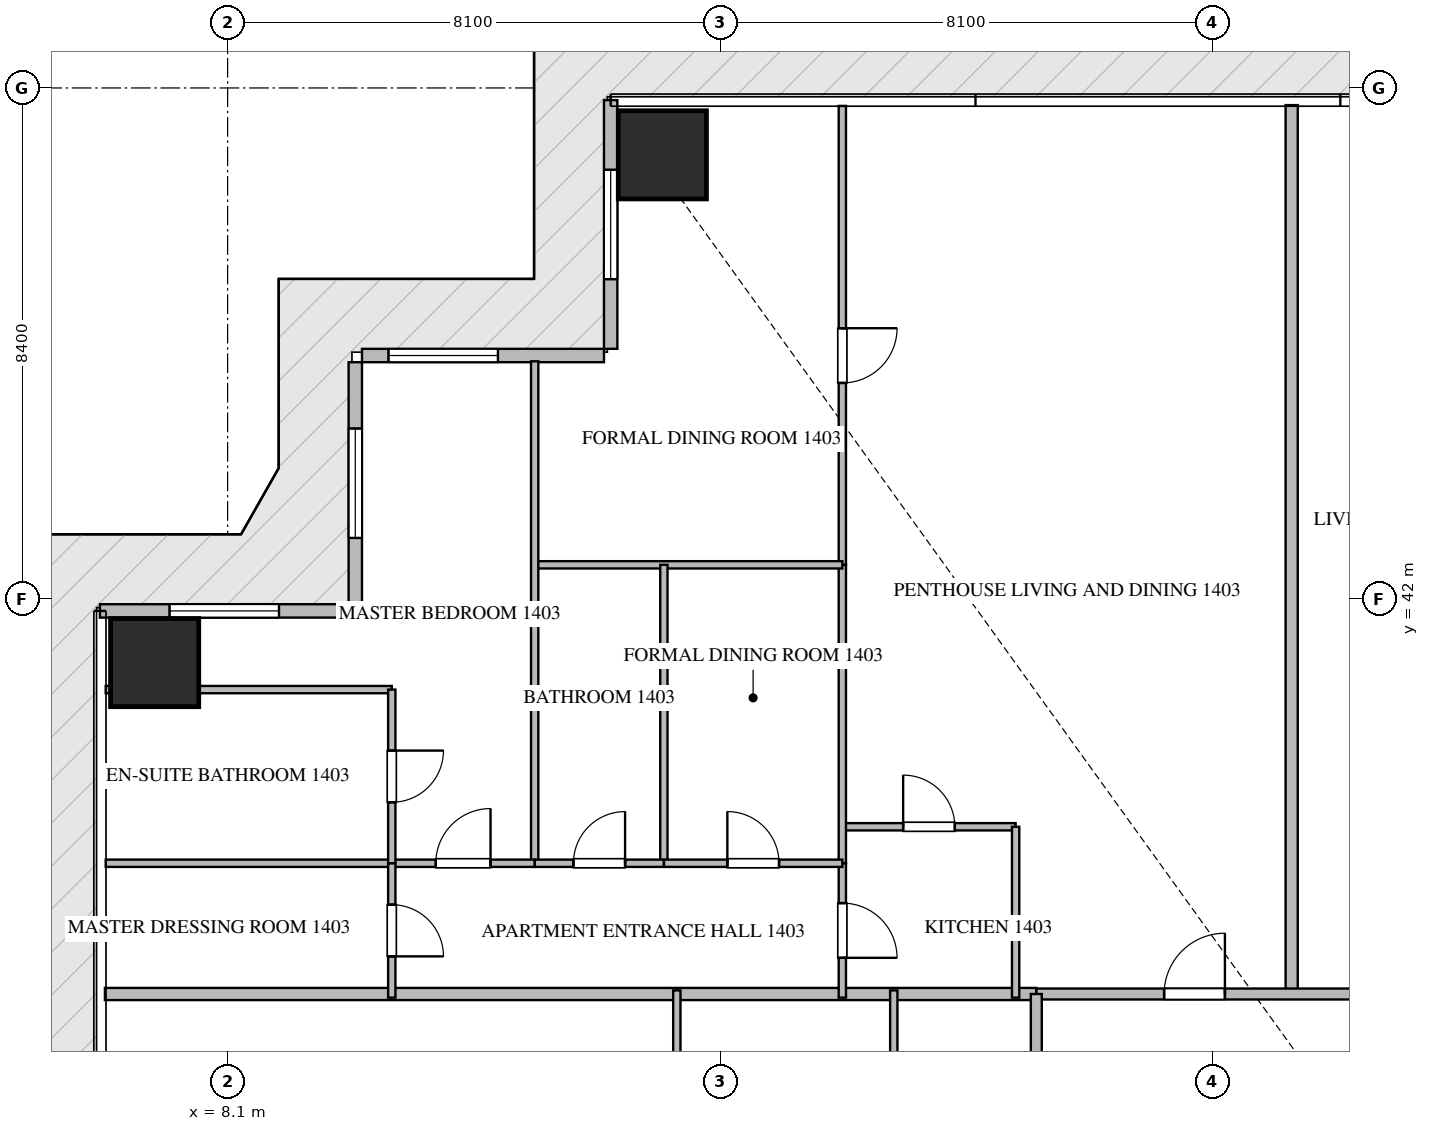
"""IFC4 building model, lengths in metres.
Left out: names, types, materials, properties, quantities, classifications, styles, units other than length and angle.
Written with IfcOpenShell. Run it as: python <this file> out.ifc"""

import sys

from ifc_helpers import new_model, si_unit, direction, frame, frame_2d, origin, origin_2d, place, context, subcontext, project, spatial, rectangle, extrude, source, transform, mapped, element, fill, save


model = new_model("IFC4")
c1 = context("Model", 3, precision=1e-05, world=origin(), true_north=direction((0.0, 1.0)))
c2 = subcontext(c1, "Body", "Model", "MODEL_VIEW")
j1 = project(units=[si_unit("LENGTHUNIT", "METRE"), si_unit("PLANEANGLEUNIT", "RADIAN")], contexts=[c1])
p1 = place(None, origin())
s1 = spatial("IfcSite", under=j1, at=p1, CompositionType="ELEMENT")
p2 = place(p1, origin())
s2 = spatial("IfcBuilding", under=s1, at=p2, CompositionType="ELEMENT")
p3 = place(p2, frame((0.0, 0.0, 60.45)))
s3 = spatial("IfcBuildingStorey", under=s2, at=p3, CompositionType="ELEMENT", Elevation=60.45)
m1 = source(origin(), c2, "Body", "SweptSolid", [
    extrude(rectangle(XDim=1.45, YDim=1.45, at=origin_2d()), origin(), (0.0, 0.0, 1.0), 3.75),
])
for number, where, z_axis, x_axis in (
    (1, (15.25, 49.3, -0.26), (0.0, 0.0, 1.0), (1.0, 0.0, 0.0)),
    (2, (6.9, 40.95, -0.26), (0.0, 0.0, 1.0), (1.0, 0.0, 0.0)),
):
    element("IfcColumn", number, at=place(p3, frame(where, z_axis=z_axis, x_axis=x_axis)), inside=s3, PredefinedType="COLUMN", context=c2, shape_type="MappedRepresentation", body=[
        mapped(m1, transform((0.0, 0.0, 0.0), scale=1.0)),
    ])
p4 = place(p3, frame((14.4, 50.2, 0.0), z_axis=(0.0, 0.0, 1.0), x_axis=(0.0, -1.0, 0.0)))
e3 = element("IfcWall", 3, at=p4, inside=s3, PredefinedType="ELEMENTEDWALL", context=c2, shape_type="SweptSolid", body=[
    extrude(rectangle(XDim=4.09, YDim=0.22, at=frame_2d((2.045, 0.0))), origin(), (0.0, 0.0, 1.0), 3.475),
])
p5 = place(p4, frame((1.145, 0.0, 0.65)))
e4 = element("IfcOpeningElement", 4, at=p5, cuts=e3, PredefinedType="OPENING", context=c2, shape_type="SweptSolid", body=[
    extrude(rectangle(XDim=1.8, YDim=2.1, at=frame_2d((0.9, 1.05))), frame((0.0, 0.12, 0.0), z_axis=(0.0, -1.0, 0.0), x_axis=(1.0, 0.0, 0.0)), (0.0, 0.0, 1.0), 0.24),
])
p6 = place(p3, frame((14.29, 46.0, 0.0), z_axis=(0.0, 0.0, 1.0), x_axis=(-1.0, 0.0, 0.0)))
e5 = element("IfcWall", 5, at=p6, inside=s3, PredefinedType="ELEMENTEDWALL", context=c2, shape_type="SweptSolid", body=[
    extrude(rectangle(XDim=3.98, YDim=0.22, at=frame_2d((1.99, 0.0))), origin(), (0.0, 0.0, 1.0), 3.475),
])
p7 = place(p6, frame((1.744, 0.0, 0.65)))
e6 = element("IfcOpeningElement", 6, at=p7, cuts=e5, PredefinedType="OPENING", context=c2, shape_type="SweptSolid", body=[
    extrude(rectangle(XDim=1.8, YDim=2.1, at=frame_2d((0.9, 1.05))), frame((0.0, 0.12, 0.0), z_axis=(0.0, -1.0, 0.0), x_axis=(1.0, 0.0, 0.0)), (0.0, 0.0, 1.0), 0.24),
])
p8 = place(p3, frame((10.2, 45.89, 0.0), z_axis=(0.0, 0.0, 1.0), x_axis=(0.0, -1.0, 0.0)))
e7 = element("IfcWall", 7, at=p8, inside=s3, PredefinedType="ELEMENTEDWALL", context=c2, shape_type="SweptSolid", body=[
    extrude(rectangle(XDim=3.98, YDim=0.22, at=frame_2d((1.99, 0.0))), origin(), (0.0, 0.0, 1.0), 3.475),
])
p9 = place(p8, frame((1.09, 0.0, 0.65)))
e8 = element("IfcOpeningElement", 8, at=p9, cuts=e7, PredefinedType="OPENING", context=c2, shape_type="SweptSolid", body=[
    extrude(rectangle(XDim=1.8, YDim=2.1, at=frame_2d((0.9, 1.05))), frame((0.0, 0.12, 0.0), z_axis=(0.0, -1.0, 0.0), x_axis=(1.0, 0.0, 0.0)), (0.0, 0.0, 1.0), 0.24),
])
p10 = place(p3, frame((10.09, 41.8, 0.0), z_axis=(0.0, 0.0, 1.0), x_axis=(-1.0, 0.0, 0.0)))
e9 = element("IfcWall", 9, at=p10, inside=s3, PredefinedType="ELEMENTEDWALL", context=c2, shape_type="SweptSolid", body=[
    extrude(rectangle(XDim=4.09, YDim=0.22, at=frame_2d((2.045, 0.0))), origin(), (0.0, 0.0, 1.0), 3.475),
])
p11 = place(p10, frame((1.145, 0.0, 0.65)))
e10 = element("IfcOpeningElement", 10, at=p11, cuts=e9, PredefinedType="OPENING", context=c2, shape_type="SweptSolid", body=[
    extrude(rectangle(XDim=1.8, YDim=2.1, at=frame_2d((0.9, 1.05))), frame((0.0, 0.12, 0.0), z_axis=(0.0, -1.0, 0.0), x_axis=(1.0, 0.0, 0.0)), (0.0, 0.0, 1.0), 0.24),
])
p12 = place(p3, frame((25.6, 35.5, 0.0), z_axis=(0.0, 0.0, 1.0), x_axis=(0.0, 1.0, 0.0)))
e11 = element("IfcWall", 11, at=p12, inside=s3, PredefinedType="PARTITIONING", context=c2, shape_type="SweptSolid", body=[
    extrude(rectangle(XDim=14.618, YDim=0.2, at=frame_2d((7.309, 0.0))), origin(), (0.0, 0.0, 1.0), 3.49),
])
p13 = place(p3, frame((6.082, 35.5, 0.0), z_axis=(0.0, 0.0, 1.0), x_axis=(1.0, 0.0, 0.0)))
e12 = element("IfcWall", 12, at=p13, inside=s3, PredefinedType="PARTITIONING", context=c2, shape_type="SweptSolid", body=[
    extrude(rectangle(XDim=15.318, YDim=0.2, at=frame_2d((7.659, 0.0))), origin(), (0.0, 0.0, 1.0), 3.49),
])
p14 = place(p3, frame((21.402, 35.5, 0.0), z_axis=(0.0, 0.0, 1.0), x_axis=(1.0, 0.0, 0.0)))
e13 = element("IfcWall", 13, at=p14, inside=s3, PredefinedType="PARTITIONING", context=c2, shape_type="SweptSolid", body=[
    extrude(rectangle(XDim=21.996, YDim=0.18, at=frame_2d((10.998, 0.0))), origin(), (0.0, 0.0, 1.0), 3.49),
])
p15 = place(p14, frame((2.1, 0.0, 0.0)))
e14 = element("IfcOpeningElement", 14, at=p15, cuts=e13, PredefinedType="OPENING", context=c2, shape_type="SweptSolid", body=[
    extrude(rectangle(XDim=1.0, YDim=2.15, at=frame_2d((0.5, 1.075))), frame((0.0, 0.1, 0.0), z_axis=(0.0, -1.0, 0.0), x_axis=(1.0, 0.0, 0.0)), (0.0, 0.0, 1.0), 0.2),
])
p16 = place(p14, frame((5.942, 0.0, 0.0)))
e15 = element("IfcOpeningElement", 15, at=p16, cuts=e13, PredefinedType="OPENING", context=c2, shape_type="SweptSolid", body=[
    extrude(rectangle(XDim=1.0, YDim=2.15, at=frame_2d((0.5, 1.075))), frame((0.0, 0.1, 0.0), z_axis=(0.0, -1.0, 0.0), x_axis=(1.0, 0.0, 0.0)), (0.0, 0.0, 1.0), 0.2),
])
p17 = place(p14, frame((16.272, 0.0, 0.0)))
e16 = element("IfcOpeningElement", 16, at=p17, cuts=e13, PredefinedType="OPENING", context=c2, shape_type="SweptSolid", body=[
    extrude(rectangle(XDim=1.0, YDim=2.15, at=frame_2d((0.5, 1.075))), frame((0.0, 0.1, 0.0), z_axis=(0.0, -1.0, 0.0), x_axis=(1.0, 0.0, 0.0)), (0.0, 0.0, 1.0), 0.2),
])
p18 = place(p3, frame((21.4, 14.9, 0.0), z_axis=(0.0, 0.0, 1.0), x_axis=(0.0, 1.0, 0.0)))
e17 = element("IfcWall", 17, at=p18, inside=s3, PredefinedType="PARTITIONING", context=c2, shape_type="SweptSolid", body=[
    extrude(rectangle(XDim=20.6, YDim=0.18, at=frame_2d((10.3, 0.0))), origin(), (0.0, 0.0, 1.0), 3.49),
])
p19 = place(p18, frame((8.996, 0.0, 0.0)))
e18 = element("IfcOpeningElement", 18, at=p19, cuts=e17, PredefinedType="OPENING", context=c2, shape_type="SweptSolid", body=[
    extrude(rectangle(XDim=1.0, YDim=2.15, at=frame_2d((0.5, 1.075))), frame((0.0, 0.1, 0.0), z_axis=(0.0, -1.0, 0.0), x_axis=(1.0, 0.0, 0.0)), (0.0, 0.0, 1.0), 0.2),
])
p20 = place(p18, frame((13.191, 0.0, 0.0)))
e19 = element("IfcOpeningElement", 19, at=p20, cuts=e17, PredefinedType="OPENING", context=c2, shape_type="SweptSolid", body=[
    extrude(rectangle(XDim=1.0, YDim=2.15, at=frame_2d((0.5, 1.075))), frame((0.0, 0.1, 0.0), z_axis=(0.0, -1.0, 0.0), x_axis=(1.0, 0.0, 0.0)), (0.0, 0.0, 1.0), 0.2),
])
p21 = place(p3, frame((18.21, 38.25, 0.0), z_axis=(0.0, 0.0, 1.0), x_axis=(1.0, 0.0, 0.0)))
e20 = element("IfcWall", 20, at=p21, inside=s3, PredefinedType="PARTITIONING", context=c2, shape_type="SweptSolid", body=[
    extrude(rectangle(XDim=2.85, YDim=0.12, at=frame_2d((1.425, 0.0))), origin(), (0.0, 0.0, 1.0), 3.49),
])
p22 = place(p21, frame((1.0, 0.0, 0.0)))
e21 = element("IfcOpeningElement", 21, at=p22, cuts=e20, PredefinedType="OPENING", context=c2, shape_type="SweptSolid", body=[
    extrude(rectangle(XDim=0.85, YDim=2.1, at=frame_2d((0.425, 1.05))), frame((0.0, 0.07, 0.0), z_axis=(0.0, -1.0, 0.0), x_axis=(1.0, 0.0, 0.0)), (0.0, 0.0, 1.0), 0.14),
])
p23 = place(p3, frame((21.06, 38.25, 0.0), z_axis=(0.0, 0.0, 1.0), x_axis=(0.0, -1.0, 0.0)))
e22 = element("IfcWall", 22, at=p23, inside=s3, PredefinedType="PARTITIONING", context=c2, shape_type="SweptSolid", body=[
    extrude(rectangle(XDim=2.81, YDim=0.12, at=frame_2d((1.405, 0.0))), origin(), (0.0, 0.0, 1.0), 3.49),
])
p24 = place(p3, frame((18.21, 37.65, 0.0), z_axis=(0.0, 0.0, 1.0), x_axis=(0.0, -1.0, 0.0)))
e23 = element("IfcWall", 23, at=p24, inside=s3, PredefinedType="PARTITIONING", context=c2, shape_type="SweptSolid", body=[
    extrude(rectangle(XDim=2.21, YDim=0.12, at=frame_2d((1.105, 0.0))), origin(), (0.0, 0.0, 1.0), 3.49),
])
p25 = place(p24, frame((0.655, 0.0, 0.0)))
e24 = element("IfcOpeningElement", 24, at=p25, cuts=e23, PredefinedType="OPENING", context=c2, shape_type="SweptSolid", body=[
    extrude(rectangle(XDim=0.9, YDim=2.1, at=frame_2d((0.45, 1.05))), frame((0.0, 0.07, 0.0), z_axis=(0.0, -1.0, 0.0), x_axis=(1.0, 0.0, 0.0)), (0.0, 0.0, 1.0), 0.14),
])
p26 = place(p3, frame((18.21, 50.105, 0.0), z_axis=(0.0, 0.0, 1.0), x_axis=(0.0, -1.0, 0.0)))
e25 = element("IfcWall", 25, at=p26, inside=s3, PredefinedType="PARTITIONING", context=c2, shape_type="SweptSolid", body=[
    extrude(rectangle(XDim=7.547, YDim=0.12, at=frame_2d((3.773, 0.0))), origin(), (0.0, 0.0, 1.0), 3.49),
])
p27 = place(p26, frame((3.656, 0.0, 0.0)))
e26 = element("IfcOpeningElement", 26, at=p27, cuts=e25, PredefinedType="OPENING", context=c2, shape_type="SweptSolid", body=[
    extrude(rectangle(XDim=0.9, YDim=2.1, at=frame_2d((0.45, 1.05))), frame((0.0, 0.07, 0.0), z_axis=(0.0, -1.0, 0.0), x_axis=(1.0, 0.0, 0.0)), (0.0, 0.0, 1.0), 0.14),
])
p28 = place(p3, frame((18.21, 42.556, 0.0), z_axis=(0.0, 0.0, 1.0), x_axis=(0.0, -1.0, 0.0)))
e27 = element("IfcWall", 27, at=p28, inside=s3, PredefinedType="PARTITIONING", context=c2, shape_type="SweptSolid", body=[
    extrude(rectangle(XDim=4.904, YDim=0.12, at=frame_2d((2.452, 0.0))), origin(), (0.0, 0.0, 1.0), 3.49),
])
p29 = place(p3, frame((13.15, 42.558, 0.0), z_axis=(0.0, 0.0, 1.0), x_axis=(1.0, 0.0, 0.0)))
e28 = element("IfcWall", 28, at=p29, inside=s3, PredefinedType="PARTITIONING", context=c2, shape_type="SweptSolid", body=[
    extrude(rectangle(XDim=5.06, YDim=0.12, at=frame_2d((2.53, 0.0))), origin(), (0.0, 0.0, 1.0), 3.49),
])
p30 = place(p3, frame((13.15, 45.905, 0.0), z_axis=(0.0, 0.0, 1.0), x_axis=(0.0, -1.0, 0.0)))
e29 = element("IfcWall", 29, at=p30, inside=s3, PredefinedType="PARTITIONING", context=c2, shape_type="SweptSolid", body=[
    extrude(rectangle(XDim=8.255, YDim=0.12, at=frame_2d((4.127, 0.0))), origin(), (0.0, 0.0, 1.0), 3.49),
])
p31 = place(p3, frame((15.275, 42.558, 0.0), z_axis=(0.0, 0.0, 1.0), x_axis=(0.0, -1.0, 0.0)))
e30 = element("IfcWall", 30, at=p31, inside=s3, PredefinedType="PARTITIONING", context=c2, shape_type="SweptSolid", body=[
    extrude(rectangle(XDim=4.908, YDim=0.12, at=frame_2d((2.454, 0.0))), origin(), (0.0, 0.0, 1.0), 2.922),
])
p32 = place(p3, frame((13.15, 37.65, 0.0), z_axis=(0.0, 0.0, 1.0), x_axis=(1.0, 0.0, 0.0)))
e31 = element("IfcWall", 31, at=p32, inside=s3, PredefinedType="PARTITIONING", context=c2, shape_type="SweptSolid", body=[
    extrude(rectangle(XDim=2.125, YDim=0.12, at=frame_2d((1.062, 0.0))), origin(), (0.0, 0.0, 1.0), 3.49),
])
p33 = place(p32, frame((0.637, 0.0, 0.0)))
e32 = element("IfcOpeningElement", 32, at=p33, cuts=e31, PredefinedType="OPENING", context=c2, shape_type="SweptSolid", body=[
    extrude(rectangle(XDim=0.85, YDim=2.1, at=frame_2d((0.425, 1.05))), frame((0.0, 0.07, 0.0), z_axis=(0.0, -1.0, 0.0), x_axis=(1.0, 0.0, 0.0)), (0.0, 0.0, 1.0), 0.14),
])
p34 = place(p3, frame((15.277, 37.65, 0.0), z_axis=(0.0, 0.0, 1.0), x_axis=(1.0, 0.0, 0.0)))
e33 = element("IfcWall", 33, at=p34, inside=s3, PredefinedType="PARTITIONING", context=c2, shape_type="SweptSolid", body=[
    extrude(rectangle(XDim=2.933, YDim=0.12, at=frame_2d((1.466, 0.0))), origin(), (0.0, 0.0, 1.0), 3.49),
])
p35 = place(p34, frame((1.042, 0.0, 0.0)))
e34 = element("IfcOpeningElement", 34, at=p35, cuts=e33, PredefinedType="OPENING", context=c2, shape_type="SweptSolid", body=[
    extrude(rectangle(XDim=0.85, YDim=2.1, at=frame_2d((0.425, 1.05))), frame((0.0, 0.07, 0.0), z_axis=(0.0, -1.0, 0.0), x_axis=(1.0, 0.0, 0.0)), (0.0, 0.0, 1.0), 0.14),
])
p36 = place(p3, frame((10.8, 37.65, 0.0), z_axis=(0.0, 0.0, 1.0), x_axis=(1.0, 0.0, 0.0)))
e35 = element("IfcWall", 35, at=p36, inside=s3, PredefinedType="PARTITIONING", context=c2, shape_type="SweptSolid", body=[
    extrude(rectangle(XDim=2.348, YDim=0.12, at=frame_2d((1.174, 0.0))), origin(), (0.0, 0.0, 1.0), 3.49),
])
p37 = place(p36, frame((0.724, 0.0, 0.0)))
e36 = element("IfcOpeningElement", 36, at=p37, cuts=e35, PredefinedType="OPENING", context=c2, shape_type="SweptSolid", body=[
    extrude(rectangle(XDim=0.9, YDim=2.1, at=frame_2d((0.45, 1.05))), frame((0.0, 0.07, 0.0), z_axis=(0.0, -1.0, 0.0), x_axis=(1.0, 0.0, 0.0)), (0.0, 0.0, 1.0), 0.14),
])
p38 = place(p3, frame((6.095, 40.506, 0.0), z_axis=(0.0, 0.0, 1.0), x_axis=(1.0, 0.0, 0.0)))
e37 = element("IfcWall", 37, at=p38, inside=s3, PredefinedType="PARTITIONING", context=c2, shape_type="SweptSolid", body=[
    extrude(rectangle(XDim=4.705, YDim=0.12, at=frame_2d((2.353, 0.0))), origin(), (0.0, 0.0, 1.0), 3.49),
])
p39 = place(p3, frame((6.095, 37.65, 0.0), z_axis=(0.0, 0.0, 1.0), x_axis=(1.0, 0.0, 0.0)))
e38 = element("IfcWall", 38, at=p39, inside=s3, PredefinedType="PARTITIONING", context=c2, shape_type="SweptSolid", body=[
    extrude(rectangle(XDim=4.703, YDim=0.12, at=frame_2d((2.352, 0.0))), origin(), (0.0, 0.0, 1.0), 3.49),
])
p40 = place(p3, frame((10.8, 40.506, 0.0), z_axis=(0.0, 0.0, 1.0), x_axis=(0.0, -1.0, 0.0)))
e39 = element("IfcWall", 39, at=p40, inside=s3, PredefinedType="PARTITIONING", context=c2, shape_type="SweptSolid", body=[
    extrude(rectangle(XDim=2.856, YDim=0.12, at=frame_2d((1.428, 0.0))), origin(), (0.0, 0.0, 1.0), 3.49),
])
p41 = place(p40, frame((1.003, 0.0, 0.0)))
e40 = element("IfcOpeningElement", 40, at=p41, cuts=e39, PredefinedType="OPENING", context=c2, shape_type="SweptSolid", body=[
    extrude(rectangle(XDim=0.85, YDim=2.1, at=frame_2d((0.425, 1.05))), frame((0.0, 0.07, 0.0), z_axis=(0.0, -1.0, 0.0), x_axis=(1.0, 0.0, 0.0)), (0.0, 0.0, 1.0), 0.14),
])
p42 = place(p3, frame((10.8, 37.648, 0.0), z_axis=(0.0, 0.0, 1.0), x_axis=(0.0, -1.0, 0.0)))
e41 = element("IfcWall", 41, at=p42, inside=s3, PredefinedType="PARTITIONING", context=c2, shape_type="SweptSolid", body=[
    extrude(rectangle(XDim=2.208, YDim=0.12, at=frame_2d((1.104, 0.0))), origin(), (0.0, 0.0, 1.0), 3.49),
])
p43 = place(p42, frame((0.679, 0.0, 0.0)))
e42 = element("IfcOpeningElement", 42, at=p43, cuts=e41, PredefinedType="OPENING", context=c2, shape_type="SweptSolid", body=[
    extrude(rectangle(XDim=0.85, YDim=2.1, at=frame_2d((0.425, 1.05))), frame((0.0, 0.07, 0.0), z_axis=(0.0, -1.0, 0.0), x_axis=(1.0, 0.0, 0.0)), (0.0, 0.0, 1.0), 0.14),
])
p44 = place(p3, frame((15.488, 31.0, 0.0), z_axis=(0.0, 0.0, 1.0), x_axis=(0.0, 1.0, 0.0)))
e43 = element("IfcWall", 43, at=p44, inside=s3, PredefinedType="PARTITIONING", context=c2, shape_type="SweptSolid", body=[
    extrude(rectangle(XDim=4.56, YDim=0.12, at=frame_2d((2.28, 0.0))), origin(), (0.0, 0.0, 1.0), 2.922),
])
p45 = place(p3, frame((19.056, 31.0, 0.0), z_axis=(0.0, 0.0, 1.0), x_axis=(0.0, 1.0, 0.0)))
e44 = element("IfcWall", 44, at=p45, inside=s3, PredefinedType="PARTITIONING", context=c2, shape_type="SweptSolid", body=[
    extrude(rectangle(XDim=4.56, YDim=0.12, at=frame_2d((2.28, 0.0))), origin(), (0.0, 0.0, 1.0), 3.49),
])
m2 = source(origin(), c2, "Body", "SweptSolid", [
    extrude(rectangle(XDim=1.8, YDim=2.1, at=frame_2d((0.9, 1.05))), frame((0.0, 0.03, 0.0), z_axis=(0.0, -1.0, 0.0), x_axis=(1.0, 0.0, 0.0)), (0.0, 0.0, 1.0), 0.06),
])
p46 = place(p5, origin())
e45 = element("IfcWindow", 45, at=p46, inside=s3, PartitioningType="SINGLE_PANEL", PredefinedType="WINDOW", context=c2, shape_type="MappedRepresentation", body=[
    mapped(m2, transform((0.0, 0.0, 0.0), scale=1.0)),
])
fill(e4, e45)
p47 = place(p7, origin())
e46 = element("IfcWindow", 46, at=p47, inside=s3, PartitioningType="SINGLE_PANEL", PredefinedType="WINDOW", context=c2, shape_type="MappedRepresentation", body=[
    mapped(m2, transform((0.0, 0.0, 0.0), scale=1.0)),
])
fill(e6, e46)
p48 = place(p9, origin())
e47 = element("IfcWindow", 47, at=p48, inside=s3, PartitioningType="SINGLE_PANEL", PredefinedType="WINDOW", context=c2, shape_type="MappedRepresentation", body=[
    mapped(m2, transform((0.0, 0.0, 0.0), scale=1.0)),
])
fill(e8, e47)
p49 = place(p11, origin())
e48 = element("IfcWindow", 48, at=p49, inside=s3, PartitioningType="SINGLE_PANEL", PredefinedType="WINDOW", context=c2, shape_type="MappedRepresentation", body=[
    mapped(m2, transform((0.0, 0.0, 0.0), scale=1.0)),
])
fill(e10, e48)
m3 = source(origin(), c2, "Body", "SweptSolid", [
    extrude(rectangle(XDim=1.0, YDim=2.15, at=frame_2d((0.5, 1.075))), frame((0.0, 0.025, 0.0), z_axis=(0.0, -1.0, 0.0), x_axis=(1.0, 0.0, 0.0)), (0.0, 0.0, 1.0), 0.05),
])
p50 = place(p15, origin())
e49 = element("IfcDoor", 49, at=p50, inside=s3, OperationType="SINGLE_SWING_RIGHT", PredefinedType="DOOR", context=c2, shape_type="MappedRepresentation", body=[
    mapped(m3, transform((0.0, 0.0, 0.0), scale=1.0)),
])
fill(e14, e49)
m4 = source(origin(), c2, "Body", "SweptSolid", [
    extrude(rectangle(XDim=0.85, YDim=2.1, at=frame_2d((0.425, 1.05))), frame((0.0, 0.025, 0.0), z_axis=(0.0, -1.0, 0.0), x_axis=(1.0, 0.0, 0.0)), (0.0, 0.0, 1.0), 0.05),
])
p51 = place(p22, origin())
e50 = element("IfcDoor", 50, at=p51, inside=s3, OperationType="SINGLE_SWING_LEFT", PredefinedType="DOOR", context=c2, shape_type="MappedRepresentation", body=[
    mapped(m4, transform((0.0, 0.0, 0.0), scale=1.0)),
])
fill(e21, e50)
m5 = source(origin(), c2, "Body", "SweptSolid", [
    extrude(rectangle(XDim=0.9, YDim=2.1, at=frame_2d((0.45, 1.05))), frame((0.0, 0.025, 0.0), z_axis=(0.0, -1.0, 0.0), x_axis=(1.0, 0.0, 0.0)), (0.0, 0.0, 1.0), 0.05),
])
p52 = place(p25, origin())
e51 = element("IfcDoor", 51, at=p52, inside=s3, OperationType="SINGLE_SWING_RIGHT", PredefinedType="DOOR", context=c2, shape_type="MappedRepresentation", body=[
    mapped(m5, transform((0.0, 0.0, 0.0), scale=1.0)),
])
fill(e24, e51)
p53 = place(p27, origin())
e52 = element("IfcDoor", 52, at=p53, inside=s3, OperationType="SINGLE_SWING_LEFT", PredefinedType="DOOR", context=c2, shape_type="MappedRepresentation", body=[
    mapped(m5, transform((0.0, 0.0, 0.0), scale=1.0)),
])
fill(e26, e52)
p54 = place(p33, origin())
e53 = element("IfcDoor", 53, at=p54, inside=s3, OperationType="SINGLE_SWING_RIGHT", PredefinedType="DOOR", context=c2, shape_type="MappedRepresentation", body=[
    mapped(m4, transform((0.0, 0.0, 0.0), scale=1.0)),
])
fill(e32, e53)
p55 = place(p35, origin())
e54 = element("IfcDoor", 54, at=p55, inside=s3, OperationType="SINGLE_SWING_LEFT", PredefinedType="DOOR", context=c2, shape_type="MappedRepresentation", body=[
    mapped(m4, transform((0.0, 0.0, 0.0), scale=1.0)),
])
fill(e34, e54)
p56 = place(p37, origin())
e55 = element("IfcDoor", 55, at=p56, inside=s3, OperationType="SINGLE_SWING_RIGHT", PredefinedType="DOOR", context=c2, shape_type="MappedRepresentation", body=[
    mapped(m5, transform((0.0, 0.0, 0.0), scale=1.0)),
])
fill(e36, e55)
p57 = place(p41, origin())
e56 = element("IfcDoor", 56, at=p57, inside=s3, OperationType="SINGLE_SWING_LEFT", PredefinedType="DOOR", context=c2, shape_type="MappedRepresentation", body=[
    mapped(m4, transform((0.0, 0.0, 0.0), scale=1.0)),
])
fill(e40, e56)
p58 = place(p43, origin())
e57 = element("IfcDoor", 57, at=p58, inside=s3, OperationType="SINGLE_SWING_RIGHT", PredefinedType="DOOR", context=c2, shape_type="MappedRepresentation", body=[
    mapped(m4, transform((0.0, 0.0, 0.0), scale=1.0)),
])
fill(e42, e57)
save(model, sys.argv[1])
